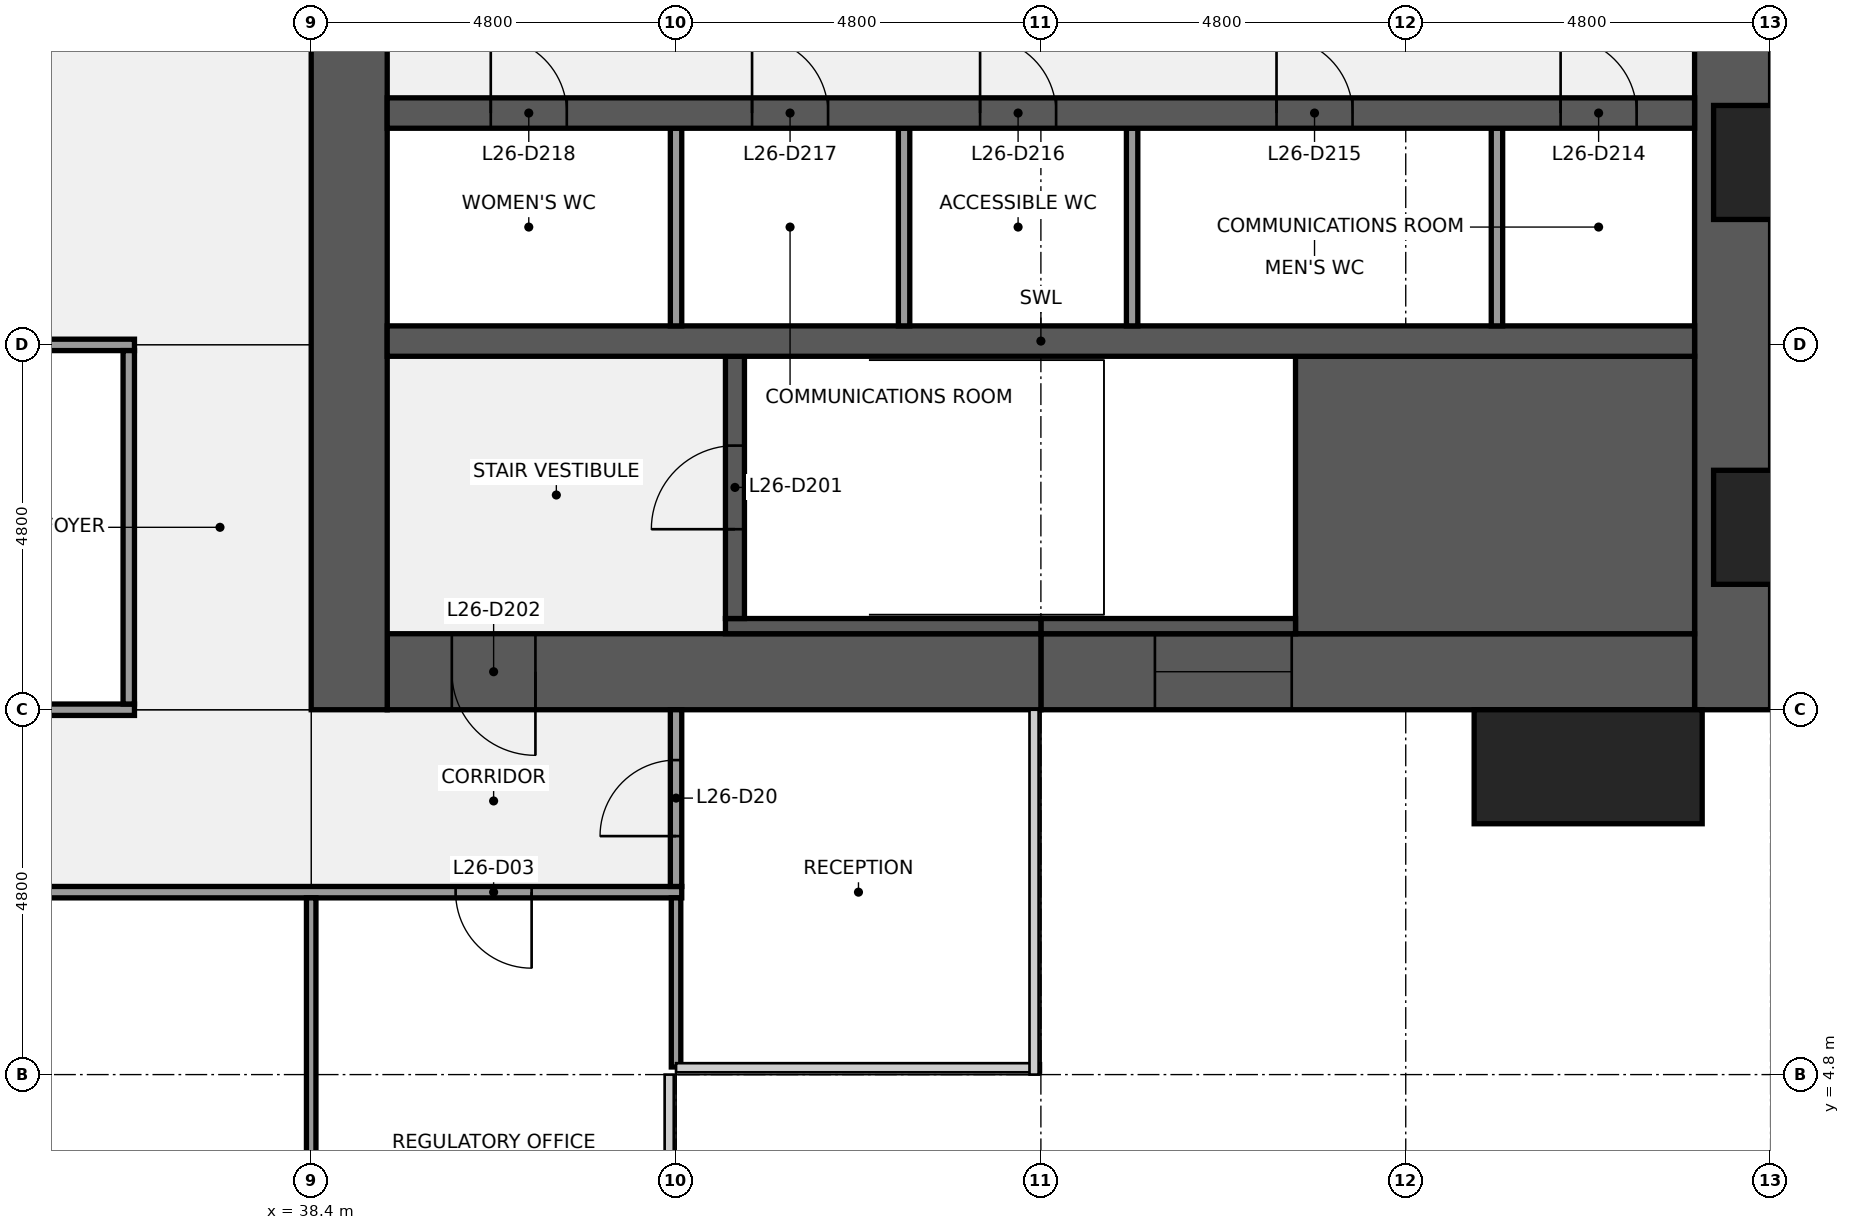
"""IFC4 building model, lengths in metres.
Left out: names, types, materials, properties, quantities, classifications, styles, units other than length and angle.
Written with IfcOpenShell. Run it as: python <this file> out.ifc"""

import sys

from ifc_helpers import new_model, si_unit, direction, frame, frame_2d, origin, origin_2d, place, context, subcontext, project, spatial, rectangle, extrude, element, fill, save


model = new_model("IFC4")
c1 = context("Model", 3, precision=1e-05, world=origin(), true_north=direction((0.0, 1.0)))
c2 = subcontext(c1, "Body", "Model", "MODEL_VIEW")
j1 = project(units=[si_unit("LENGTHUNIT", "METRE"), si_unit("PLANEANGLEUNIT", "RADIAN")], contexts=[c1])
p1 = place(None, origin())
s1 = spatial("IfcSite", under=j1, at=p1, CompositionType="ELEMENT")
p2 = place(p1, origin())
s2 = spatial("IfcBuilding", under=s1, at=p2, CompositionType="ELEMENT")
p3 = place(p2, frame((0.0, 0.0, 124.1)))
s3 = spatial("IfcBuildingStorey", under=s2, at=p3, CompositionType="ELEMENT", Elevation=124.1)
p4 = place(p3, frame((57.1, 38.4, 0.0), z_axis=(0.0, 0.0, 1.0), x_axis=(0.0, -1.0, 0.0)))
e1 = element("IfcWall", 1, at=p4, inside=s3, PredefinedType="SHEAR", context=c2, shape_type="SweptSolid", body=[
    extrude(rectangle(XDim=28.8, YDim=1.0, at=frame_2d((14.4, 0.0))), origin(), (0.0, 0.0, 1.0), 3.84),
])
p5 = place(p4, frame((18.45, 0.0, 0.9)))
e2 = element("IfcOpeningElement", 2, at=p5, cuts=e1, PredefinedType="OPENING", context=c2, shape_type="SweptSolid", body=[
    extrude(rectangle(XDim=1.5, YDim=1.5, at=frame_2d((0.75, 0.75))), frame((0.0, 0.51, 0.0), z_axis=(0.0, -1.0, 0.0), x_axis=(1.0, 0.0, 0.0)), (0.0, 0.0, 1.0), 1.02),
])
p6 = place(p4, frame((8.85, 0.0, 0.9)))
e3 = element("IfcOpeningElement", 3, at=p6, cuts=e1, PredefinedType="OPENING", context=c2, shape_type="SweptSolid", body=[
    extrude(rectangle(XDim=1.5, YDim=1.5, at=frame_2d((0.75, 0.75))), frame((0.0, 0.51, 0.0), z_axis=(0.0, -1.0, 0.0), x_axis=(1.0, 0.0, 0.0)), (0.0, 0.0, 1.0), 1.02),
])
p7 = place(p3, frame((56.6, 10.1, 0.0), z_axis=(0.0, 0.0, 1.0), x_axis=(-1.0, 0.0, 0.0)))
e4 = element("IfcWall", 4, at=p7, inside=s3, PredefinedType="SHEAR", context=c2, shape_type="SweptSolid", body=[
    extrude(rectangle(XDim=8.6, YDim=1.0, at=frame_2d((4.3, 0.0))), origin(), (0.0, 0.0, 1.0), 3.84),
])
p8 = place(p7, frame((5.3, 0.0, 0.9)))
e5 = element("IfcOpeningElement", 5, at=p8, cuts=e4, PredefinedType="OPENING", context=c2, shape_type="SweptSolid", body=[
    extrude(rectangle(XDim=1.8, YDim=1.5, at=frame_2d((0.9, 0.75))), frame((0.0, 0.51, 0.0), z_axis=(0.0, -1.0, 0.0), x_axis=(1.0, 0.0, 0.0)), (0.0, 0.0, 1.0), 1.02),
])
p9 = place(p3, frame((48.0, 10.1, 0.0), z_axis=(0.0, 0.0, 1.0), x_axis=(-1.0, 0.0, 0.0)))
e6 = element("IfcWall", 6, at=p9, inside=s3, PredefinedType="SHEAR", context=c2, shape_type="SweptSolid", body=[
    extrude(rectangle(XDim=8.6, YDim=1.0, at=frame_2d((4.3, 0.0))), origin(), (0.0, 0.0, 1.0), 3.84),
])
p10 = place(p9, frame((6.65, 0.0, 0.0)))
e7 = element("IfcOpeningElement", 7, at=p10, cuts=e6, PredefinedType="OPENING", context=c2, shape_type="SweptSolid", body=[
    extrude(rectangle(XDim=1.1, YDim=2.1, at=frame_2d((0.55, 1.05))), frame((0.0, 0.51, 0.0), z_axis=(0.0, -1.0, 0.0), x_axis=(1.0, 0.0, 0.0)), (0.0, 0.0, 1.0), 1.02),
])
p11 = place(p3, frame((38.9, 9.6, 0.0), z_axis=(0.0, 0.0, 1.0), x_axis=(0.0, 1.0, 0.0)))
e8 = element("IfcWall", 8, at=p11, inside=s3, PredefinedType="SHEAR", context=c2, shape_type="SweptSolid", body=[
    extrude(rectangle(XDim=28.8, YDim=1.0, at=frame_2d((14.4, 0.0))), origin(), (0.0, 0.0, 1.0), 3.84),
])
p12 = place(p11, frame((8.7, 0.0, 0.0)))
e9 = element("IfcOpeningElement", 9, at=p12, cuts=e8, PredefinedType="OPENING", context=c2, shape_type="SweptSolid", body=[
    extrude(rectangle(XDim=1.8, YDim=2.1, at=frame_2d((0.9, 1.05))), frame((0.0, 0.51, 0.0), z_axis=(0.0, -1.0, 0.0), x_axis=(1.0, 0.0, 0.0)), (0.0, 0.0, 1.0), 1.02),
])
p13 = place(p11, frame((18.3, 0.0, 0.0)))
e10 = element("IfcOpeningElement", 10, at=p13, cuts=e8, PredefinedType="OPENING", context=c2, shape_type="SweptSolid", body=[
    extrude(rectangle(XDim=1.8, YDim=2.1, at=frame_2d((0.9, 1.05))), frame((0.0, 0.51, 0.0), z_axis=(0.0, -1.0, 0.0), x_axis=(1.0, 0.0, 0.0)), (0.0, 0.0, 1.0), 1.02),
])
p14 = place(p3, frame((51.35, 12.425, 0.0), z_axis=(0.0, 0.0, 1.0), x_axis=(1.0, 0.0, 0.0)))
e11 = element("IfcWall", 11, at=p14, inside=s3, PredefinedType="SHEAR", context=c2, shape_type="SweptSolid", body=[
    extrude(rectangle(XDim=5.25, YDim=3.65, at=frame_2d((2.625, 0.0))), origin(), (0.0, 0.0, 1.0), 3.84),
])
p15 = place(p3, frame((48.0, 10.7, 0.0), z_axis=(0.0, 0.0, 1.0), x_axis=(1.0, 0.0, 0.0)))
e12 = element("IfcWall", 12, at=p15, inside=s3, PredefinedType="SHEAR", context=c2, shape_type="SweptSolid", body=[
    extrude(rectangle(XDim=3.35, YDim=0.2, at=frame_2d((1.675, 0.0))), origin(), (0.0, 0.0, 1.0), 3.84),
])
p16 = place(p3, frame((43.85, 10.7, 0.0), z_axis=(0.0, 0.0, 1.0), x_axis=(1.0, 0.0, 0.0)))
e13 = element("IfcWall", 13, at=p16, inside=s3, PredefinedType="SHEAR", context=c2, shape_type="SweptSolid", body=[
    extrude(rectangle(XDim=4.15, YDim=0.2, at=frame_2d((2.075, 0.0))), origin(), (0.0, 0.0, 1.0), 3.84),
])
p17 = place(p3, frame((43.975, 10.8, 0.0), z_axis=(0.0, 0.0, 1.0), x_axis=(0.0, 1.0, 0.0)))
e14 = element("IfcWall", 14, at=p17, inside=s3, PredefinedType="SHEAR", context=c2, shape_type="SweptSolid", body=[
    extrude(rectangle(XDim=3.45, YDim=0.25, at=frame_2d((1.725, 0.0))), origin(), (0.0, 0.0, 1.0), 3.84),
])
p18 = place(p17, frame((1.175, 0.0, 0.0)))
e15 = element("IfcOpeningElement", 15, at=p18, cuts=e14, PredefinedType="OPENING", context=c2, shape_type="SweptSolid", body=[
    extrude(rectangle(XDim=1.1, YDim=2.1, at=frame_2d((0.55, 1.05))), frame((0.0, 0.135, 0.0), z_axis=(0.0, -1.0, 0.0), x_axis=(1.0, 0.0, 0.0)), (0.0, 0.0, 1.0), 0.27),
])
p19 = place(p3, frame((39.4, 14.45, 0.0), z_axis=(0.0, 0.0, 1.0), x_axis=(1.0, 0.0, 0.0)))
e16 = element("IfcWall", 16, at=p19, inside=s3, PredefinedType="SHEAR", context=c2, shape_type="SweptSolid", body=[
    extrude(rectangle(XDim=17.2, YDim=0.4, at=frame_2d((8.6, 0.0))), origin(), (0.0, 0.0, 1.0), 3.84),
])
for number, where, z_axis, x_axis in (
    (17, (54.0, 14.65, 0.0), (0.0, 0.0, 1.0), (0.0, 1.0, 0.0)),
    (18, (49.2, 14.65, 0.0), (0.0, 0.0, 1.0), (0.0, 1.0, 0.0)),
    (19, (46.2, 14.65, 0.0), (0.0, 0.0, 1.0), (0.0, 1.0, 0.0)),
    (20, (43.2, 14.65, 0.0), (0.0, 0.0, 1.0), (0.0, 1.0, 0.0)),
):
    element("IfcWall", number, at=place(p3, frame(where, z_axis=z_axis, x_axis=x_axis)), inside=s3, PredefinedType="PARTITIONING", context=c2, shape_type="SweptSolid", body=[
        extrude(rectangle(XDim=2.6, YDim=0.15, at=frame_2d((1.3, 0.0))), origin(), (0.0, 0.0, 1.0), 3.84),
    ])
p20 = place(p3, frame((39.4, 17.45, 0.0), z_axis=(0.0, 0.0, 1.0), x_axis=(1.0, 0.0, 0.0)))
e21 = element("IfcWall", 21, at=p20, inside=s3, PredefinedType="SHEAR", context=c2, shape_type="SweptSolid", body=[
    extrude(rectangle(XDim=17.2, YDim=0.4, at=frame_2d((8.6, 0.0))), origin(), (0.0, 0.0, 1.0), 3.84),
])
p21 = place(p20, frame((15.438, 0.0, 0.0)))
e22 = element("IfcOpeningElement", 22, at=p21, cuts=e21, PredefinedType="OPENING", context=c2, shape_type="SweptSolid", body=[
    extrude(rectangle(XDim=1.0, YDim=2.1, at=frame_2d((0.5, 1.05))), frame((0.0, 0.21, 0.0), z_axis=(0.0, -1.0, 0.0), x_axis=(1.0, 0.0, 0.0)), (0.0, 0.0, 1.0), 0.42),
])
p22 = place(p20, frame((11.7, 0.0, 0.0)))
e23 = element("IfcOpeningElement", 23, at=p22, cuts=e21, PredefinedType="OPENING", context=c2, shape_type="SweptSolid", body=[
    extrude(rectangle(XDim=1.0, YDim=2.1, at=frame_2d((0.5, 1.05))), frame((0.0, 0.21, 0.0), z_axis=(0.0, -1.0, 0.0), x_axis=(1.0, 0.0, 0.0)), (0.0, 0.0, 1.0), 0.42),
])
p23 = place(p20, frame((7.8, 0.0, 0.0)))
e24 = element("IfcOpeningElement", 24, at=p23, cuts=e21, PredefinedType="OPENING", context=c2, shape_type="SweptSolid", body=[
    extrude(rectangle(XDim=1.0, YDim=2.1, at=frame_2d((0.5, 1.05))), frame((0.0, 0.21, 0.0), z_axis=(0.0, -1.0, 0.0), x_axis=(1.0, 0.0, 0.0)), (0.0, 0.0, 1.0), 0.42),
])
p24 = place(p20, frame((4.8, 0.0, 0.0)))
e25 = element("IfcOpeningElement", 25, at=p24, cuts=e21, PredefinedType="OPENING", context=c2, shape_type="SweptSolid", body=[
    extrude(rectangle(XDim=1.0, YDim=2.1, at=frame_2d((0.5, 1.05))), frame((0.0, 0.21, 0.0), z_axis=(0.0, -1.0, 0.0), x_axis=(1.0, 0.0, 0.0)), (0.0, 0.0, 1.0), 0.42),
])
p25 = place(p20, frame((1.363, 0.0, 0.0)))
e26 = element("IfcOpeningElement", 26, at=p25, cuts=e21, PredefinedType="OPENING", context=c2, shape_type="SweptSolid", body=[
    extrude(rectangle(XDim=1.0, YDim=2.1, at=frame_2d((0.5, 1.05))), frame((0.0, 0.21, 0.0), z_axis=(0.0, -1.0, 0.0), x_axis=(1.0, 0.0, 0.0)), (0.0, 0.0, 1.0), 0.42),
])
p26 = place(p3, frame((14.325, 7.2, 0.0), z_axis=(0.0, 0.0, 1.0), x_axis=(1.0, 0.0, 0.0)))
e27 = element("IfcWall", 27, at=p26, inside=s3, PredefinedType="PARTITIONING", context=c2, shape_type="SweptSolid", body=[
    extrude(rectangle(XDim=28.95, YDim=0.15, at=frame_2d((14.475, 0.0))), origin(), (0.0, 0.0, 1.0), 2.849),
])
p27 = place(p26, frame((1.975, 0.0, 0.0)))
e28 = element("IfcOpeningElement", 28, at=p27, cuts=e27, PredefinedType="OPENING", context=c2, shape_type="SweptSolid", body=[
    extrude(rectangle(XDim=1.0, YDim=2.1, at=frame_2d((0.5, 1.05))), frame((0.0, 0.085, 0.0), z_axis=(0.0, -1.0, 0.0), x_axis=(1.0, 0.0, 0.0)), (0.0, 0.0, 1.0), 0.17),
])
p28 = place(p26, frame((13.975, 0.0, 0.0)))
e29 = element("IfcOpeningElement", 29, at=p28, cuts=e27, PredefinedType="OPENING", context=c2, shape_type="SweptSolid", body=[
    extrude(rectangle(XDim=1.0, YDim=2.1, at=frame_2d((0.5, 1.05))), frame((0.0, 0.085, 0.0), z_axis=(0.0, -1.0, 0.0), x_axis=(1.0, 0.0, 0.0)), (0.0, 0.0, 1.0), 0.17),
])
p29 = place(p26, frame((25.975, 0.0, 0.0)))
e30 = element("IfcOpeningElement", 30, at=p29, cuts=e27, PredefinedType="OPENING", context=c2, shape_type="SweptSolid", body=[
    extrude(rectangle(XDim=1.0, YDim=2.1, at=frame_2d((0.5, 1.05))), frame((0.0, 0.085, 0.0), z_axis=(0.0, -1.0, 0.0), x_axis=(1.0, 0.0, 0.0)), (0.0, 0.0, 1.0), 0.17),
])
p30 = place(p3, frame((21.525, 9.6, 0.0), z_axis=(0.0, 0.0, 1.0), x_axis=(1.0, 0.0, 0.0)))
e31 = element("IfcWall", 31, at=p30, inside=s3, PredefinedType="PARTITIONING", context=c2, shape_type="SweptSolid", body=[
    extrude(rectangle(XDim=14.55, YDim=0.15, at=frame_2d((7.275, 0.0))), origin(), (0.0, 0.0, 1.0), 2.849),
])
p31 = place(p30, frame((3.175, 0.0, 0.0)))
e32 = element("IfcOpeningElement", 32, at=p31, cuts=e31, PredefinedType="OPENING", context=c2, shape_type="SweptSolid", body=[
    extrude(rectangle(XDim=1.0, YDim=2.1, at=frame_2d((0.5, 1.05))), frame((0.0, 0.085, 0.0), z_axis=(0.0, -1.0, 0.0), x_axis=(1.0, 0.0, 0.0)), (0.0, 0.0, 1.0), 0.17),
])
p32 = place(p30, frame((10.375, 0.0, 0.0)))
e33 = element("IfcOpeningElement", 33, at=p32, cuts=e31, PredefinedType="OPENING", context=c2, shape_type="SweptSolid", body=[
    extrude(rectangle(XDim=1.0, YDim=2.1, at=frame_2d((0.5, 1.05))), frame((0.0, 0.085, 0.0), z_axis=(0.0, -1.0, 0.0), x_axis=(1.0, 0.0, 0.0)), (0.0, 0.0, 1.0), 0.17),
])
p33 = place(p3, frame((33.675, 14.4, 0.0), z_axis=(0.0, 0.0, 1.0), x_axis=(1.0, 0.0, 0.0)))
e34 = element("IfcWall", 34, at=p33, inside=s3, PredefinedType="PARTITIONING", context=c2, shape_type="SweptSolid", body=[
    extrude(rectangle(XDim=2.4, YDim=0.15, at=frame_2d((1.2, 0.0))), origin(), (0.0, 0.0, 1.0), 2.849),
])
p34 = place(p3, frame((36.0, 9.675, 0.0), z_axis=(0.0, 0.0, 1.0), x_axis=(0.0, 1.0, 0.0)))
e35 = element("IfcWall", 35, at=p34, inside=s3, PredefinedType="PARTITIONING", context=c2, shape_type="SweptSolid", body=[
    extrude(rectangle(XDim=4.65, YDim=0.15, at=frame_2d((2.325, 0.0))), origin(), (0.0, 0.0, 1.0), 2.849),
])
p35 = place(p3, frame((38.4, 0.6, 0.0), z_axis=(0.0, 0.0, 1.0), x_axis=(0.0, 1.0, 0.0)))
e36 = element("IfcWall", 36, at=p35, inside=s3, PredefinedType="PARTITIONING", context=c2, shape_type="SweptSolid", body=[
    extrude(rectangle(XDim=6.525, YDim=0.125, at=frame_2d((3.262, 0.0))), origin(), (0.0, 0.0, 1.0), 2.849),
])
p36 = place(p3, frame((43.2, 4.9, 0.0), z_axis=(0.0, 0.0, 1.0), x_axis=(0.0, 1.0, 0.0)))
e37 = element("IfcWall", 37, at=p36, inside=s3, PredefinedType="PARTITIONING", context=c2, shape_type="SweptSolid", body=[
    extrude(rectangle(XDim=2.225, YDim=0.125, at=frame_2d((1.113, 0.0))), origin(), (0.0, 0.0, 1.0), 2.849),
])
p37 = place(p3, frame((43.2, 7.275, 0.0), z_axis=(0.0, 0.0, 1.0), x_axis=(0.0, 1.0, 0.0)))
e38 = element("IfcWall", 38, at=p37, inside=s3, PredefinedType="PARTITIONING", context=c2, shape_type="SweptSolid", body=[
    extrude(rectangle(XDim=2.325, YDim=0.15, at=frame_2d((1.163, 0.0))), origin(), (0.0, 0.0, 1.0), 2.849),
])
p38 = place(p37, frame((0.663, 0.0, 0.0)))
e39 = element("IfcOpeningElement", 39, at=p38, cuts=e38, PredefinedType="OPENING", context=c2, shape_type="SweptSolid", body=[
    extrude(rectangle(XDim=1.0, YDim=2.1, at=frame_2d((0.5, 1.05))), frame((0.0, 0.085, 0.0), z_axis=(0.0, -1.0, 0.0), x_axis=(1.0, 0.0, 0.0)), (0.0, 0.0, 1.0), 0.17),
])
p39 = place(p3, frame((55.2, 8.85, 0.0), z_axis=(0.0, 0.0, 1.0), x_axis=(1.0, 0.0, 0.0)))
e40 = element("IfcColumn", 40, at=p39, inside=s3, PredefinedType="PILASTER", context=c2, shape_type="SweptSolid", body=[
    extrude(rectangle(XDim=3.0, YDim=1.5, at=origin_2d()), origin(), (0.0, 0.0, 1.0), 4.0),
])
p40 = place(p18, origin())
e41 = element("IfcDoor", 41, at=p40, inside=s3, OperationType="SINGLE_SWING_LEFT", PredefinedType="DOOR", context=c2, shape_type="SweptSolid", body=[
    extrude(rectangle(XDim=1.1, YDim=2.1, at=frame_2d((0.55, 1.05))), frame((0.0, 0.025, 0.0), z_axis=(0.0, -1.0, 0.0), x_axis=(1.0, 0.0, 0.0)), (0.0, 0.0, 1.0), 0.05),
])
fill(e15, e41)
p41 = place(p10, origin())
e42 = element("IfcDoor", 42, at=p41, inside=s3, OperationType="SINGLE_SWING_LEFT", PredefinedType="DOOR", context=c2, shape_type="SweptSolid", body=[
    extrude(rectangle(XDim=1.1, YDim=2.1, at=frame_2d((0.55, 1.05))), frame((0.0, 0.025, 0.0), z_axis=(0.0, -1.0, 0.0), x_axis=(1.0, 0.0, 0.0)), (0.0, 0.0, 1.0), 0.05),
])
fill(e7, e42)
p42 = place(p21, origin())
e43 = element("IfcDoor", 43, at=p42, inside=s3, OperationType="SINGLE_SWING_LEFT", PredefinedType="DOOR", context=c2, shape_type="SweptSolid", body=[
    extrude(rectangle(XDim=1.0, YDim=2.1, at=frame_2d((0.5, 1.05))), frame((0.0, 0.025, 0.0), z_axis=(0.0, -1.0, 0.0), x_axis=(1.0, 0.0, 0.0)), (0.0, 0.0, 1.0), 0.05),
])
fill(e22, e43)
p43 = place(p22, origin())
e44 = element("IfcDoor", 44, at=p43, inside=s3, OperationType="SINGLE_SWING_LEFT", PredefinedType="DOOR", context=c2, shape_type="SweptSolid", body=[
    extrude(rectangle(XDim=1.0, YDim=2.1, at=frame_2d((0.5, 1.05))), frame((0.0, 0.025, 0.0), z_axis=(0.0, -1.0, 0.0), x_axis=(1.0, 0.0, 0.0)), (0.0, 0.0, 1.0), 0.05),
])
fill(e23, e44)
p44 = place(p23, origin())
e45 = element("IfcDoor", 45, at=p44, inside=s3, OperationType="SINGLE_SWING_LEFT", PredefinedType="DOOR", context=c2, shape_type="SweptSolid", body=[
    extrude(rectangle(XDim=1.0, YDim=2.1, at=frame_2d((0.5, 1.05))), frame((0.0, 0.025, 0.0), z_axis=(0.0, -1.0, 0.0), x_axis=(1.0, 0.0, 0.0)), (0.0, 0.0, 1.0), 0.05),
])
fill(e24, e45)
p45 = place(p24, origin())
e46 = element("IfcDoor", 46, at=p45, inside=s3, OperationType="SINGLE_SWING_LEFT", PredefinedType="DOOR", context=c2, shape_type="SweptSolid", body=[
    extrude(rectangle(XDim=1.0, YDim=2.1, at=frame_2d((0.5, 1.05))), frame((0.0, 0.025, 0.0), z_axis=(0.0, -1.0, 0.0), x_axis=(1.0, 0.0, 0.0)), (0.0, 0.0, 1.0), 0.05),
])
fill(e25, e46)
p46 = place(p25, origin())
e47 = element("IfcDoor", 47, at=p46, inside=s3, OperationType="SINGLE_SWING_LEFT", PredefinedType="DOOR", context=c2, shape_type="SweptSolid", body=[
    extrude(rectangle(XDim=1.0, YDim=2.1, at=frame_2d((0.5, 1.05))), frame((0.0, 0.025, 0.0), z_axis=(0.0, -1.0, 0.0), x_axis=(1.0, 0.0, 0.0)), (0.0, 0.0, 1.0), 0.05),
])
fill(e26, e47)
p47 = place(p8, origin())
e48 = element("IfcWindow", 48, at=p47, inside=s3, PartitioningType="SINGLE_PANEL", PredefinedType="WINDOW", context=c2, shape_type="SweptSolid", body=[
    extrude(rectangle(XDim=1.8, YDim=1.5, at=frame_2d((0.9, 0.75))), frame((0.0, 0.03, 0.0), z_axis=(0.0, -1.0, 0.0), x_axis=(1.0, 0.0, 0.0)), (0.0, 0.0, 1.0), 0.06),
])
fill(e5, e48)
p48 = place(p29, origin())
e49 = element("IfcDoor", 49, at=p48, inside=s3, OperationType="SINGLE_SWING_RIGHT", PredefinedType="DOOR", context=c2, shape_type="SweptSolid", body=[
    extrude(rectangle(XDim=1.0, YDim=2.1, at=frame_2d((0.5, 1.05))), frame((0.0, 0.025, 0.0), z_axis=(0.0, -1.0, 0.0), x_axis=(1.0, 0.0, 0.0)), (0.0, 0.0, 1.0), 0.05),
])
fill(e30, e49)
p49 = place(p38, origin())
e50 = element("IfcDoor", 50, at=p49, inside=s3, OperationType="SINGLE_SWING_LEFT", PredefinedType="DOOR", context=c2, shape_type="SweptSolid", body=[
    extrude(rectangle(XDim=1.0, YDim=2.1, at=frame_2d((0.5, 1.05))), frame((0.0, 0.025, 0.0), z_axis=(0.0, -1.0, 0.0), x_axis=(1.0, 0.0, 0.0)), (0.0, 0.0, 1.0), 0.05),
])
fill(e39, e50)
save(model, sys.argv[1])
